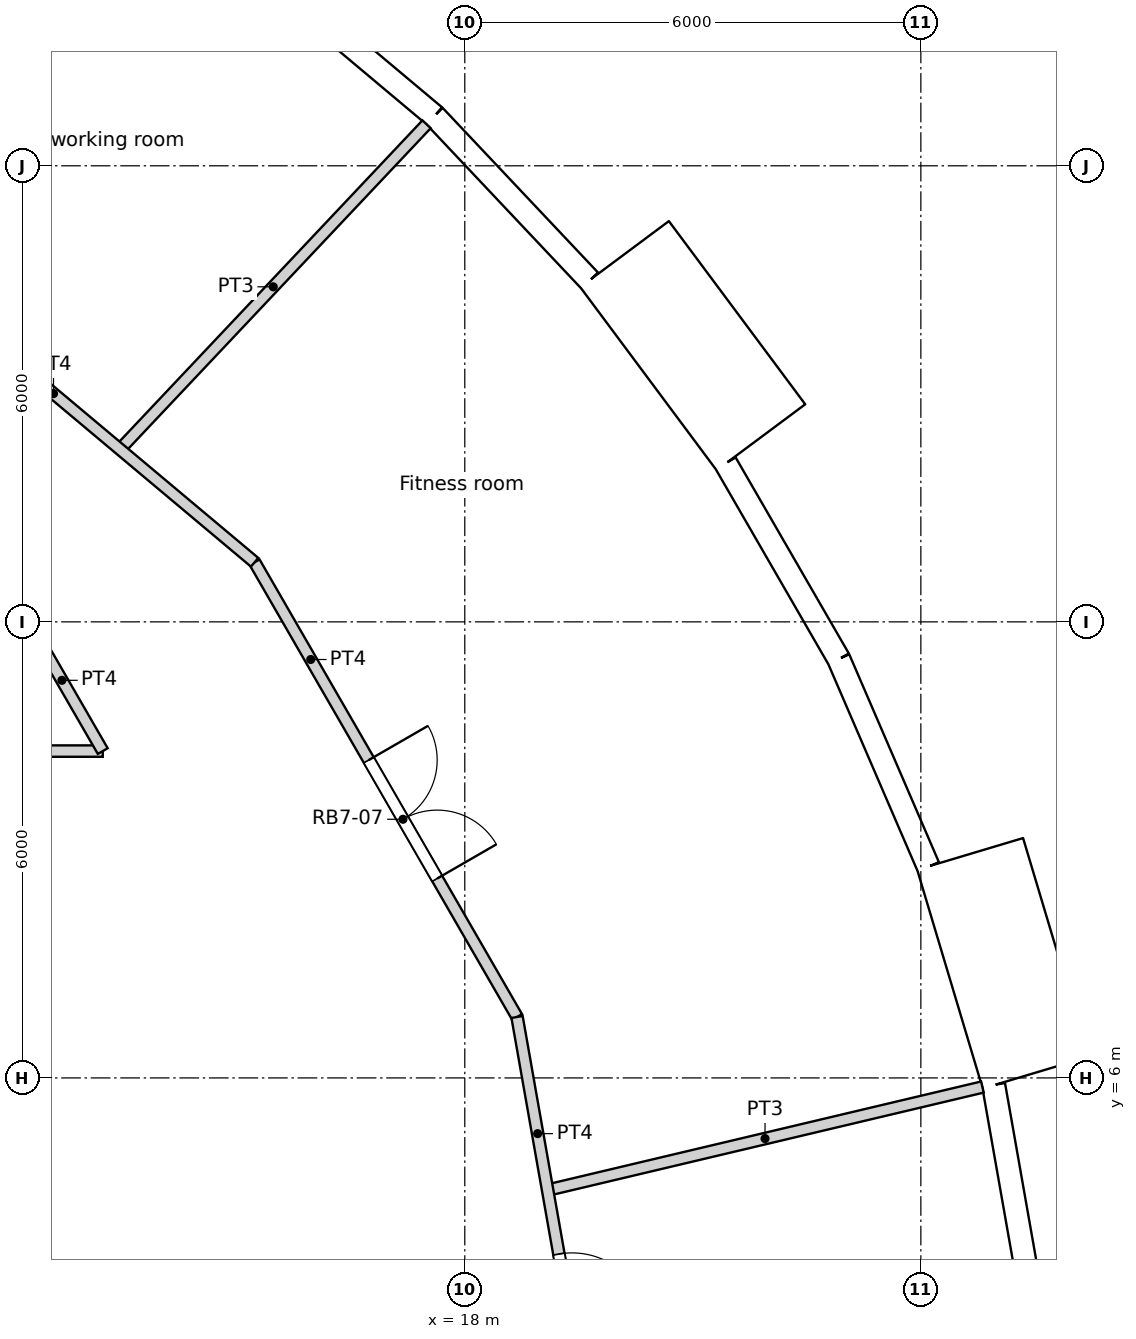
"""IFC4 building model, lengths in metres.
Left out: names, types, materials, properties, quantities, classifications, styles, units other than length and angle.
Written with IfcOpenShell. Run it as: python <this file> out.ifc"""

import sys

from ifc_helpers import new_model, si_unit, direction, frame, frame_2d, origin, origin_2d, place, context, subcontext, project, spatial, rectangle, circle, extrude, element, fill, save


model = new_model("IFC4")
c1 = context("Model", 3, precision=1e-05, world=origin(), true_north=direction((0.0, 1.0)))
c2 = subcontext(c1, "Body", "Model", "MODEL_VIEW")
j1 = project(units=[si_unit("LENGTHUNIT", "METRE"), si_unit("PLANEANGLEUNIT", "RADIAN")], contexts=[c1])
p1 = place(None, origin())
s1 = spatial("IfcSite", under=j1, at=p1, CompositionType="ELEMENT")
p2 = place(p1, origin())
s2 = spatial("IfcBuilding", under=s1, at=p2, CompositionType="ELEMENT")
p3 = place(p2, frame((0.0, 0.0, 190.8)))
s3 = spatial("IfcBuildingStorey", under=s2, at=p3, CompositionType="ELEMENT", Elevation=190.8)
for number, where, z_axis, x_axis in (
    (1, (23.886, 5.661, 0.0), (0.0, 0.0, 1.0), (1.0, 0.0, 0.0)),
    (2, (21.937, 11.017, 0.0), (0.0, 0.0, 1.0), (1.0, 0.0, 0.0)),
    (3, (18.805, 15.779, 0.0), (0.0, 0.0, 1.0), (1.0, 0.0, 0.0)),
    (4, (14.659, 19.69, 0.0), (0.0, 0.0, 1.0), (1.0, 0.0, 0.0)),
):
    element("IfcColumn", number, at=place(p3, frame(where, z_axis=z_axis, x_axis=x_axis)), inside=s3, PredefinedType="COLUMN", context=c2, shape_type="SweptSolid", body=[
        extrude(circle(Radius=0.6, at=origin_2d()), origin(), (0.0, 0.0, 1.0), 3.6),
    ])
for number, where, z_axis, x_axis in (
    (5, (17.986, 5.548, 0.0), (0.0, 0.0, 1.0), (1.0, 0.0, 0.0)),
    (6, (15.552, 10.603, 0.0), (0.0, 0.0, 1.0), (1.0, 0.0, 0.0)),
):
    element("IfcColumn", number, at=place(p3, frame(where, z_axis=z_axis, x_axis=x_axis)), inside=s3, PredefinedType="COLUMN", context=c2, shape_type="SweptSolid", body=[
        extrude(circle(Radius=0.65, at=origin_2d()), origin(), (0.0, 0.0, 1.0), 3.6),
    ])
p4 = place(p3, frame((25.474, 2.978, 0.0), z_axis=(0.0, 0.0, 1.0), x_axis=(-0.173686952598, 0.984800915159, 0.0)))
e7 = element("IfcWall", 7, at=p4, inside=s3, PredefinedType="SOLIDWALL", context=c2, shape_type="SweptSolid", body=[
    extrude(rectangle(XDim=2.973, YDim=0.3, at=frame_2d((1.486, 0.0))), origin(), (0.0, 0.0, 1.0), 3.3),
])
p5 = place(p4, frame((1.486, 0.0, 1.55)))
e8 = element("IfcOpeningElement", 8, at=p5, cuts=e7, PredefinedType="OPENING", context=c2, shape_type="SweptSolid", body=[
    extrude(circle(Radius=0.9, at=origin_2d()), frame((0.0, 0.16, 0.0), z_axis=(0.0, -1.0, 0.0), x_axis=(1.0, 0.0, 0.0)), (0.0, 0.0, 1.0), 0.32),
])
p6 = place(p3, frame((25.51, 6.071, -0.3), z_axis=(0.0, 0.0, 1.0), x_axis=(-0.286780420304, 0.957996341606, 0.0)))
e9 = element("IfcWall", 9, at=p6, inside=s3, PredefinedType="ELEMENTEDWALL", context=c2, shape_type="SweptSolid", body=[
    extrude(rectangle(XDim=3.0, YDim=1.45, at=frame_2d((1.5, 0.0))), origin(), (0.0, 0.0, 1.0), 3.6),
])
p7 = place(p6, frame((1.5, 0.0, 1.85)))
e10 = element("IfcOpeningElement", 10, at=p7, cuts=e9, PredefinedType="OPENING", context=c2, shape_type="SweptSolid", body=[
    extrude(circle(Radius=0.9, at=origin_2d()), frame((0.0, 0.735, 0.0), z_axis=(0.0, -1.0, 0.0), x_axis=(1.0, 0.0, 0.0)), (0.0, 0.0, 1.0), 1.47),
])
p8 = place(p3, frame((24.097, 8.781, 0.0), z_axis=(0.0, 0.0, 1.0), x_axis=(-0.396078892785, 0.918216483565, 0.0)))
e11 = element("IfcWall", 11, at=p8, inside=s3, PredefinedType="SOLIDWALL", context=c2, shape_type="SweptSolid", body=[
    extrude(rectangle(XDim=2.973, YDim=0.3, at=frame_2d((1.486, 0.0))), origin(), (0.0, 0.0, 1.0), 2.8),
])
p9 = place(p8, frame((1.486, 0.0, 1.55)))
e12 = element("IfcOpeningElement", 12, at=p9, cuts=e11, PredefinedType="OPENING", context=c2, shape_type="SweptSolid", body=[
    extrude(circle(Radius=0.9, at=origin_2d()), frame((0.0, 0.16, 0.0), z_axis=(0.0, -1.0, 0.0), x_axis=(1.0, 0.0, 0.0)), (0.0, 0.0, 1.0), 0.32),
])
p10 = place(p3, frame((22.919, 11.51, 0.0), z_axis=(0.0, 0.0, 1.0), x_axis=(-0.500016263033, 0.866016014115, 0.0)))
e13 = element("IfcWall", 13, at=p10, inside=s3, PredefinedType="SOLIDWALL", context=c2, shape_type="SweptSolid", body=[
    extrude(rectangle(XDim=2.973, YDim=0.3, at=frame_2d((1.487, 0.0))), origin(), (0.0, 0.0, 1.0), 3.3),
])
p11 = place(p10, frame((1.486, 0.0, 1.55)))
e14 = element("IfcOpeningElement", 14, at=p11, cuts=e13, PredefinedType="OPENING", context=c2, shape_type="SweptSolid", body=[
    extrude(circle(Radius=0.9, at=origin_2d()), frame((0.0, 0.16, 0.0), z_axis=(0.0, -1.0, 0.0), x_axis=(1.0, 0.0, 0.0)), (0.0, 0.0, 1.0), 0.32),
])
p12 = place(p3, frame((21.895, 14.43, -0.3), z_axis=(0.0, 0.0, 1.0), x_axis=(-0.597183717734, 0.802104486506, 0.0)))
e15 = element("IfcWall", 15, at=p12, inside=s3, PredefinedType="ELEMENTEDWALL", context=c2, shape_type="SweptSolid", body=[
    extrude(rectangle(XDim=3.0, YDim=1.45, at=frame_2d((1.5, 0.0))), origin(), (0.0, 0.0, 1.0), 3.6),
])
p13 = place(p12, frame((1.5, 0.0, 1.85)))
e16 = element("IfcOpeningElement", 16, at=p13, cuts=e15, PredefinedType="OPENING", context=c2, shape_type="SweptSolid", body=[
    extrude(circle(Radius=0.9, at=origin_2d()), frame((0.0, 0.735, 0.0), z_axis=(0.0, -1.0, 0.0), x_axis=(1.0, 0.0, 0.0)), (0.0, 0.0, 1.0), 1.47),
])
p14 = place(p3, frame((19.64, 16.493, 0.0), z_axis=(0.0, 0.0, 1.0), x_axis=(-0.686235184166, 0.727379730273, 0.0)))
e17 = element("IfcWall", 17, at=p14, inside=s3, PredefinedType="SOLIDWALL", context=c2, shape_type="SweptSolid", body=[
    extrude(rectangle(XDim=2.973, YDim=0.3, at=frame_2d((1.486, 0.0))), origin(), (0.0, 0.0, 1.0), 2.8),
])
p15 = place(p14, frame((1.486, 0.0, 1.55)))
e18 = element("IfcOpeningElement", 18, at=p15, cuts=e17, PredefinedType="OPENING", context=c2, shape_type="SweptSolid", body=[
    extrude(circle(Radius=0.9, at=origin_2d()), frame((0.0, 0.16, 0.0), z_axis=(0.0, -1.0, 0.0), x_axis=(1.0, 0.0, 0.0)), (0.0, 0.0, 1.0), 0.32),
])
p16 = place(p3, frame((17.6, 18.655, 0.0), z_axis=(0.0, 0.0, 1.0), x_axis=(-0.766049350637, 0.642781761089, 0.0)))
e19 = element("IfcWall", 19, at=p16, inside=s3, PredefinedType="SOLIDWALL", context=c2, shape_type="SweptSolid", body=[
    extrude(rectangle(XDim=2.973, YDim=0.3, at=frame_2d((1.486, 0.0))), origin(), (0.0, 0.0, 1.0), 3.3),
])
p17 = place(p16, frame((1.486, 0.0, 1.55)))
e20 = element("IfcOpeningElement", 20, at=p17, cuts=e19, PredefinedType="OPENING", context=c2, shape_type="SweptSolid", body=[
    extrude(circle(Radius=0.9, at=origin_2d()), frame((0.0, 0.16, 0.0), z_axis=(0.0, -1.0, 0.0), x_axis=(1.0, 0.0, 0.0)), (0.0, 0.0, 1.0), 0.32),
])
p18 = place(p3, frame((-3.025, 10.3, 0.0), z_axis=(0.0, 0.0, 1.0), x_axis=(1.0, 0.0, 0.0)))
e21 = element("IfcWall", 21, at=p18, inside=s3, PredefinedType="PARTITIONING", context=c2, shape_type="SweptSolid", body=[
    extrude(rectangle(XDim=16.262, YDim=0.15, at=frame_2d((8.131, 0.0))), origin(), (0.0, 0.0, 1.0), 3.3),
])
p19 = place(p18, frame((6.863, 0.0, 0.0)))
e22 = element("IfcOpeningElement", 22, at=p19, cuts=e21, PredefinedType="OPENING", context=c2, shape_type="SweptSolid", body=[
    extrude(rectangle(XDim=1.8, YDim=2.1, at=frame_2d((0.9, 1.05))), frame((0.0, 0.075, 0.0), z_axis=(0.0, -1.0, 0.0), x_axis=(1.0, 0.0, 0.0)), (0.0, 0.0, 1.0), 0.15),
])
p20 = place(p3, frame((12.162, 12.162, 0.0), z_axis=(0.0, 0.0, 1.0), x_axis=(0.499961633463, -0.866047553582, 0.0)))
e23 = element("IfcWall", 23, at=p20, inside=s3, PredefinedType="PARTITIONING", context=c2, shape_type="SweptSolid", body=[
    extrude(rectangle(XDim=2.15, YDim=0.15, at=frame_2d((1.075, 0.0))), origin(), (0.0, 0.0, 1.0), 3.3),
])
p21 = place(p3, frame((18.688, 6.802, 0.0), z_axis=(0.0, 0.0, 1.0), x_axis=(0.173831710537, -0.984775373581, 0.0)))
e24 = element("IfcWall", 24, at=p21, inside=s3, PredefinedType="PARTITIONING", context=c2, shape_type="SweptSolid", body=[
    extrude(rectangle(XDim=6.907, YDim=0.15, at=frame_2d((3.454, 0.0))), origin(), (0.0, 0.0, 1.0), 3.3),
])
p22 = place(p21, frame((3.167, 0.0, 0.0)))
e25 = element("IfcOpeningElement", 25, at=p22, cuts=e24, PredefinedType="OPENING", context=c2, shape_type="SweptSolid", body=[
    extrude(rectangle(XDim=1.0, YDim=2.1, at=frame_2d((0.5, 1.05))), frame((0.0, 0.075, 0.0), z_axis=(0.0, -1.0, 0.0), x_axis=(1.0, 0.0, 0.0)), (0.0, 0.0, 1.0), 0.15),
])
p23 = place(p3, frame((9.943, 17.222, 0.0), z_axis=(0.0, 0.0, 1.0), x_axis=(0.766192104565, -0.642611592567, 0.0)))
e26 = element("IfcWall", 26, at=p23, inside=s3, PredefinedType="PARTITIONING", context=c2, shape_type="SweptSolid", body=[
    extrude(rectangle(XDim=6.906, YDim=0.15, at=frame_2d((3.453, 0.0))), origin(), (0.0, 0.0, 1.0), 3.3),
])
p24 = place(p3, frame((15.235, 12.784, 0.0), z_axis=(0.0, 0.0, 1.0), x_axis=(0.499914202267, -0.866074933462, 0.0)))
e27 = element("IfcWall", 27, at=p24, inside=s3, PredefinedType="PARTITIONING", context=c2, shape_type="SweptSolid", body=[
    extrude(rectangle(XDim=6.907, YDim=0.15, at=frame_2d((3.454, 0.0))), origin(), (0.0, 0.0, 1.0), 3.3),
])
p25 = place(p24, frame((3.004, 0.0, 0.0)))
e28 = element("IfcOpeningElement", 28, at=p25, cuts=e27, PredefinedType="OPENING", context=c2, shape_type="SweptSolid", body=[
    extrude(rectangle(XDim=1.8, YDim=2.1, at=frame_2d((0.9, 1.05))), frame((0.0, 0.075, 0.0), z_axis=(0.0, -1.0, 0.0), x_axis=(1.0, 0.0, 0.0)), (0.0, 0.0, 1.0), 0.15),
])
p26 = place(p3, frame((19.09, 4.524, 0.0), z_axis=(0.0, 0.0, 1.0), x_axis=(0.973033452951, 0.230664040193, 0.0)))
e29 = element("IfcWall", 29, at=p26, inside=s3, PredefinedType="PARTITIONING", context=c2, shape_type="SweptSolid", body=[
    extrude(rectangle(XDim=5.878, YDim=0.15, at=frame_2d((2.939, 0.0))), origin(), (0.0, 0.0, 1.0), 3.3),
])
p27 = place(p3, frame((13.463, 14.27, 0.0), z_axis=(0.0, 0.0, 1.0), x_axis=(0.6862502776, 0.72736549031, 0.0)))
e30 = element("IfcWall", 30, at=p27, inside=s3, PredefinedType="PARTITIONING", context=c2, shape_type="SweptSolid", body=[
    extrude(rectangle(XDim=5.879, YDim=0.15, at=frame_2d((2.939, 0.0))), origin(), (0.0, 0.0, 1.0), 3.3),
])
p28 = place(p5, origin())
e31 = element("IfcWindow", 31, at=p28, inside=s3, PartitioningType="SINGLE_PANEL", PredefinedType="WINDOW", context=c2, shape_type="SweptSolid", body=[
    extrude(circle(Radius=0.9, at=origin_2d()), frame((0.0, 0.12, 0.0), z_axis=(0.0, -1.0, 0.0), x_axis=(1.0, 0.0, 0.0)), (0.0, 0.0, 1.0), 0.1),
])
fill(e8, e31)
p29 = place(p7, origin())
e32 = element("IfcWindow", 32, at=p29, inside=s3, PartitioningType="SINGLE_PANEL", PredefinedType="WINDOW", context=c2, shape_type="SweptSolid", body=[
    extrude(circle(Radius=0.9, at=origin_2d()), frame((0.0, 0.695, 0.0), z_axis=(0.0, -1.0, 0.0), x_axis=(1.0, 0.0, 0.0)), (0.0, 0.0, 1.0), 0.1),
])
fill(e10, e32)
p30 = place(p9, origin())
e33 = element("IfcWindow", 33, at=p30, inside=s3, PartitioningType="SINGLE_PANEL", PredefinedType="WINDOW", context=c2, shape_type="SweptSolid", body=[
    extrude(circle(Radius=0.9, at=origin_2d()), frame((0.0, 0.12, 0.0), z_axis=(0.0, -1.0, 0.0), x_axis=(1.0, 0.0, 0.0)), (0.0, 0.0, 1.0), 0.1),
])
fill(e12, e33)
p31 = place(p11, origin())
e34 = element("IfcWindow", 34, at=p31, inside=s3, PartitioningType="SINGLE_PANEL", PredefinedType="WINDOW", context=c2, shape_type="SweptSolid", body=[
    extrude(circle(Radius=0.9, at=origin_2d()), frame((0.0, 0.12, 0.0), z_axis=(0.0, -1.0, 0.0), x_axis=(1.0, 0.0, 0.0)), (0.0, 0.0, 1.0), 0.1),
])
fill(e14, e34)
p32 = place(p13, origin())
e35 = element("IfcWindow", 35, at=p32, inside=s3, PartitioningType="SINGLE_PANEL", PredefinedType="WINDOW", context=c2, shape_type="SweptSolid", body=[
    extrude(circle(Radius=0.9, at=origin_2d()), frame((0.0, 0.695, 0.0), z_axis=(0.0, -1.0, 0.0), x_axis=(1.0, 0.0, 0.0)), (0.0, 0.0, 1.0), 0.1),
])
fill(e16, e35)
p33 = place(p15, origin())
e36 = element("IfcWindow", 36, at=p33, inside=s3, PartitioningType="SINGLE_PANEL", PredefinedType="WINDOW", context=c2, shape_type="SweptSolid", body=[
    extrude(circle(Radius=0.9, at=origin_2d()), frame((0.0, 0.12, 0.0), z_axis=(0.0, -1.0, 0.0), x_axis=(1.0, 0.0, 0.0)), (0.0, 0.0, 1.0), 0.1),
])
fill(e18, e36)
p34 = place(p17, origin())
e37 = element("IfcWindow", 37, at=p34, inside=s3, PartitioningType="SINGLE_PANEL", PredefinedType="WINDOW", context=c2, shape_type="SweptSolid", body=[
    extrude(circle(Radius=0.9, at=origin_2d()), frame((0.0, 0.12, 0.0), z_axis=(0.0, -1.0, 0.0), x_axis=(1.0, 0.0, 0.0)), (0.0, 0.0, 1.0), 0.1),
])
fill(e20, e37)
p35 = place(p22, origin())
e38 = element("IfcDoor", 38, at=p35, inside=s3, OperationType="SINGLE_SWING_RIGHT", PredefinedType="DOOR", context=c2, shape_type="SweptSolid", body=[
    extrude(rectangle(XDim=1.0, YDim=2.1, at=frame_2d((0.5, 1.05))), frame((0.0, 0.025, 0.0), z_axis=(0.0, -1.0, 0.0), x_axis=(1.0, 0.0, 0.0)), (0.0, 0.0, 1.0), 0.05),
])
fill(e25, e38)
p36 = place(p25, origin())
e39 = element("IfcDoor", 39, at=p36, inside=s3, OperationType="DOUBLE_DOOR_SINGLE_SWING", PredefinedType="DOOR", context=c2, shape_type="SweptSolid", body=[
    extrude(rectangle(XDim=1.8, YDim=2.1, at=frame_2d((0.9, 1.05))), frame((0.0, 0.025, 0.0), z_axis=(0.0, -1.0, 0.0), x_axis=(1.0, 0.0, 0.0)), (0.0, 0.0, 1.0), 0.05),
])
fill(e28, e39)
save(model, sys.argv[1])
